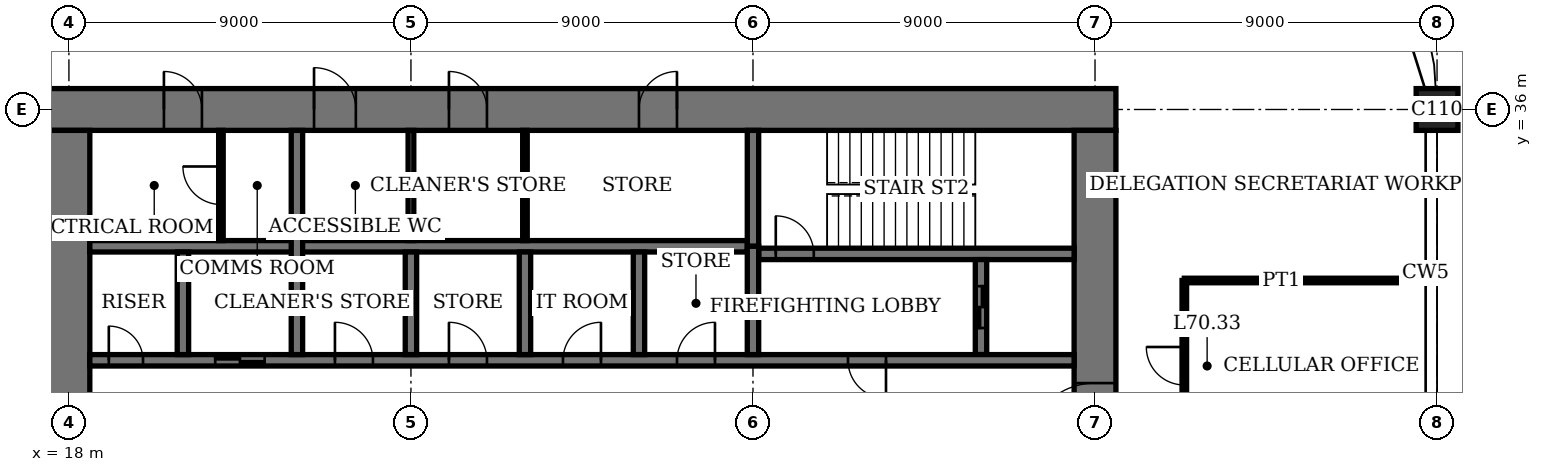
"""IFC4 building model, lengths in metres.
Left out: names, types, materials, properties, quantities, classifications, styles, units other than length and angle.
Written with IfcOpenShell. Run it as: python <this file> out.ifc"""

import sys

from ifc_helpers import new_model, si_unit, direction, frame, frame_2d, origin, origin_2d, place, context, subcontext, project, spatial, rectangle, extrude, element, fill, save


model = new_model("IFC4")
c1 = context("Model", 3, precision=1e-05, world=origin(), true_north=direction((0.0, 1.0)))
c2 = subcontext(c1, "Body", "Model", "MODEL_VIEW")
j1 = project(units=[si_unit("LENGTHUNIT", "METRE"), si_unit("PLANEANGLEUNIT", "RADIAN")], contexts=[c1])
p1 = place(None, origin())
s1 = spatial("IfcSite", under=j1, at=p1, CompositionType="ELEMENT")
p2 = place(p1, origin())
s2 = spatial("IfcBuilding", under=s1, at=p2, CompositionType="ELEMENT")
p3 = place(p2, frame((0.0, 0.0, 287.4)))
s3 = spatial("IfcBuildingStorey", under=s2, at=p3, CompositionType="ELEMENT", Elevation=287.4)
p4 = place(p3, frame((54.0, 36.0, 0.0), z_axis=(0.0, 0.0, 1.0), x_axis=(1.0, 0.0, 0.0)))
e1 = element("IfcColumn", 1, at=p4, inside=s3, PredefinedType="COLUMN", context=c2, shape_type="SweptSolid", body=[
    extrude(rectangle(XDim=1.1, YDim=1.1, at=origin_2d()), origin(), (0.0, 0.0, 1.0), 4.0),
])
p5 = place(p3, frame((45.55, 36.0, 0.0), z_axis=(0.0, 0.0, 1.0), x_axis=(-1.0, 0.0, 0.0)))
e2 = element("IfcWall", 2, at=p5, inside=s3, PredefinedType="SHEAR", context=c2, shape_type="SweptSolid", body=[
    extrude(rectangle(XDim=28.1, YDim=1.1, at=frame_2d((14.05, 0.0))), origin(), (0.0, 0.0, 1.0), 4.0),
])
p6 = place(p5, frame((11.55, 0.0, 0.0)))
e3 = element("IfcOpeningElement", 3, at=p6, cuts=e2, PredefinedType="OPENING", context=c2, shape_type="SweptSolid", body=[
    extrude(rectangle(XDim=1.0, YDim=2.4, at=frame_2d((0.5, 1.2))), frame((0.0, 0.56, 0.0), z_axis=(0.0, -1.0, 0.0), x_axis=(1.0, 0.0, 0.0)), (0.0, 0.0, 1.0), 1.12),
])
p7 = place(p5, frame((16.55, 0.0, 0.0)))
e4 = element("IfcOpeningElement", 4, at=p7, cuts=e2, PredefinedType="OPENING", context=c2, shape_type="SweptSolid", body=[
    extrude(rectangle(XDim=1.0, YDim=2.4, at=frame_2d((0.5, 1.2))), frame((0.0, 0.56, 0.0), z_axis=(0.0, -1.0, 0.0), x_axis=(1.0, 0.0, 0.0)), (0.0, 0.0, 1.0), 1.12),
])
p8 = place(p5, frame((20.0, 0.0, 0.0)))
e5 = element("IfcOpeningElement", 5, at=p8, cuts=e2, PredefinedType="OPENING", context=c2, shape_type="SweptSolid", body=[
    extrude(rectangle(XDim=1.1, YDim=2.4, at=frame_2d((0.55, 1.2))), frame((0.0, 0.56, 0.0), z_axis=(0.0, -1.0, 0.0), x_axis=(1.0, 0.0, 0.0)), (0.0, 0.0, 1.0), 1.12),
])
p9 = place(p5, frame((24.05, 0.0, 0.0)))
e6 = element("IfcOpeningElement", 6, at=p9, cuts=e2, PredefinedType="OPENING", context=c2, shape_type="SweptSolid", body=[
    extrude(rectangle(XDim=1.0, YDim=2.4, at=frame_2d((0.5, 1.2))), frame((0.0, 0.56, 0.0), z_axis=(0.0, -1.0, 0.0), x_axis=(1.0, 0.0, 0.0)), (0.0, 0.0, 1.0), 1.12),
])
p10 = place(p3, frame((18.0, 35.45, 0.0), z_axis=(0.0, 0.0, 1.0), x_axis=(0.0, -1.0, 0.0)))
e7 = element("IfcWall", 7, at=p10, inside=s3, PredefinedType="SHEAR", context=c2, shape_type="SweptSolid", body=[
    extrude(rectangle(XDim=16.9, YDim=1.1, at=frame_2d((8.45, 0.0))), origin(), (0.0, 0.0, 1.0), 4.0),
])
p11 = place(p10, frame((8.45, 0.0, 0.0)))
e8 = element("IfcOpeningElement", 8, at=p11, cuts=e7, PredefinedType="OPENING", context=c2, shape_type="SweptSolid", body=[
    extrude(rectangle(XDim=1.8, YDim=2.4, at=frame_2d((0.9, 1.2))), frame((0.0, 0.56, 0.0), z_axis=(0.0, -1.0, 0.0), x_axis=(1.0, 0.0, 0.0)), (0.0, 0.0, 1.0), 1.12),
])
p12 = place(p3, frame((45.0, 18.55, 0.0), z_axis=(0.0, 0.0, 1.0), x_axis=(0.0, 1.0, 0.0)))
e9 = element("IfcWall", 9, at=p12, inside=s3, PredefinedType="SHEAR", context=c2, shape_type="SweptSolid", body=[
    extrude(rectangle(XDim=16.9, YDim=1.1, at=frame_2d((8.45, 0.0))), origin(), (0.0, 0.0, 1.0), 4.0),
])
p13 = place(p12, frame((8.45, 0.0, 0.0)))
e10 = element("IfcOpeningElement", 10, at=p13, cuts=e9, PredefinedType="OPENING", context=c2, shape_type="SweptSolid", body=[
    extrude(rectangle(XDim=1.8, YDim=2.4, at=frame_2d((0.9, 1.2))), frame((0.0, 0.56, 0.0), z_axis=(0.0, -1.0, 0.0), x_axis=(1.0, 0.0, 0.0)), (0.0, 0.0, 1.0), 1.12),
])
p14 = place(p3, frame((36.15, 32.2, 0.0), z_axis=(0.0, 0.0, 1.0), x_axis=(1.0, 0.0, 0.0)))
e11 = element("IfcWall", 11, at=p14, inside=s3, PredefinedType="SHEAR", context=c2, shape_type="SweptSolid", body=[
    extrude(rectangle(XDim=8.3, YDim=0.3, at=frame_2d((4.15, 0.0))), origin(), (0.0, 0.0, 1.0), 4.0),
])
p15 = place(p14, frame((0.45, 0.0, 0.0)))
e12 = element("IfcOpeningElement", 12, at=p15, cuts=e11, PredefinedType="OPENING", context=c2, shape_type="SweptSolid", body=[
    extrude(rectangle(XDim=1.0, YDim=2.4, at=frame_2d((0.5, 1.2))), frame((0.0, 0.16, 0.0), z_axis=(0.0, -1.0, 0.0), x_axis=(1.0, 0.0, 0.0)), (0.0, 0.0, 1.0), 0.32),
])
p16 = place(p3, frame((36.0, 32.4, 0.0), z_axis=(0.0, 0.0, 1.0), x_axis=(0.0, 1.0, 0.0)))
e13 = element("IfcWall", 13, at=p16, inside=s3, PredefinedType="SHEAR", context=c2, shape_type="SweptSolid", body=[
    extrude(rectangle(XDim=3.05, YDim=0.3, at=frame_2d((1.525, 0.0))), origin(), (0.0, 0.0, 1.0), 4.0),
])
p17 = place(p3, frame((42.0, 29.55, 0.0), z_axis=(0.0, 0.0, 1.0), x_axis=(0.0, 1.0, 0.0)))
e14 = element("IfcWall", 14, at=p17, inside=s3, PredefinedType="SHEAR", context=c2, shape_type="SweptSolid", body=[
    extrude(rectangle(XDim=2.5, YDim=0.3, at=frame_2d((1.25, 0.0))), origin(), (0.0, 0.0, 1.0), 4.0),
])
p18 = place(p17, frame((0.7, 0.0, 0.0)))
e15 = element("IfcOpeningElement", 15, at=p18, cuts=e14, PredefinedType="OPENING", context=c2, shape_type="SweptSolid", body=[
    extrude(rectangle(XDim=1.1, YDim=2.4, at=frame_2d((0.55, 1.2))), frame((0.0, 0.16, 0.0), z_axis=(0.0, -1.0, 0.0), x_axis=(1.0, 0.0, 0.0)), (0.0, 0.0, 1.0), 0.32),
])
p19 = place(p3, frame((18.55, 29.4, 0.0), z_axis=(0.0, 0.0, 1.0), x_axis=(1.0, 0.0, 0.0)))
e16 = element("IfcWall", 16, at=p19, inside=s3, PredefinedType="SHEAR", context=c2, shape_type="SweptSolid", body=[
    extrude(rectangle(XDim=25.9, YDim=0.3, at=frame_2d((12.95, 0.0))), origin(), (0.0, 0.0, 1.0), 4.0),
])
p20 = place(p19, frame((19.95, 0.0, 0.0)))
e17 = element("IfcOpeningElement", 17, at=p20, cuts=e16, PredefinedType="OPENING", context=c2, shape_type="SweptSolid", body=[
    extrude(rectangle(XDim=1.0, YDim=2.4, at=frame_2d((0.5, 1.2))), frame((0.0, 0.16, 0.0), z_axis=(0.0, -1.0, 0.0), x_axis=(1.0, 0.0, 0.0)), (0.0, 0.0, 1.0), 0.32),
])
p21 = place(p19, frame((0.5, 0.0, 0.0)))
e18 = element("IfcOpeningElement", 18, at=p21, cuts=e16, PredefinedType="OPENING", context=c2, shape_type="SweptSolid", body=[
    extrude(rectangle(XDim=0.9, YDim=2.1, at=frame_2d((0.45, 1.05))), frame((0.0, 0.16, 0.0), z_axis=(0.0, -1.0, 0.0), x_axis=(1.0, 0.0, 0.0)), (0.0, 0.0, 1.0), 0.32),
])
p22 = place(p19, frame((15.45, 0.0, 0.0)))
e19 = element("IfcOpeningElement", 19, at=p22, cuts=e16, PredefinedType="OPENING", context=c2, shape_type="SweptSolid", body=[
    extrude(rectangle(XDim=1.0, YDim=2.4, at=frame_2d((0.5, 1.2))), frame((0.0, 0.16, 0.0), z_axis=(0.0, -1.0, 0.0), x_axis=(1.0, 0.0, 0.0)), (0.0, 0.0, 1.0), 0.32),
])
p23 = place(p19, frame((12.45, 0.0, 0.0)))
e20 = element("IfcOpeningElement", 20, at=p23, cuts=e16, PredefinedType="OPENING", context=c2, shape_type="SweptSolid", body=[
    extrude(rectangle(XDim=1.0, YDim=2.4, at=frame_2d((0.5, 1.2))), frame((0.0, 0.16, 0.0), z_axis=(0.0, -1.0, 0.0), x_axis=(1.0, 0.0, 0.0)), (0.0, 0.0, 1.0), 0.32),
])
p24 = place(p19, frame((9.45, 0.0, 0.0)))
e21 = element("IfcOpeningElement", 21, at=p24, cuts=e16, PredefinedType="OPENING", context=c2, shape_type="SweptSolid", body=[
    extrude(rectangle(XDim=1.0, YDim=2.4, at=frame_2d((0.5, 1.2))), frame((0.0, 0.16, 0.0), z_axis=(0.0, -1.0, 0.0), x_axis=(1.0, 0.0, 0.0)), (0.0, 0.0, 1.0), 0.32),
])
p25 = place(p19, frame((6.45, 0.0, 0.0)))
e22 = element("IfcOpeningElement", 22, at=p25, cuts=e16, PredefinedType="OPENING", context=c2, shape_type="SweptSolid", body=[
    extrude(rectangle(XDim=1.0, YDim=2.4, at=frame_2d((0.5, 1.2))), frame((0.0, 0.16, 0.0), z_axis=(0.0, -1.0, 0.0), x_axis=(1.0, 0.0, 0.0)), (0.0, 0.0, 1.0), 0.32),
])
p26 = place(p19, frame((3.3, 0.0, 0.0)))
e23 = element("IfcOpeningElement", 23, at=p26, cuts=e16, PredefinedType="OPENING", context=c2, shape_type="SweptSolid", body=[
    extrude(rectangle(XDim=1.3, YDim=2.4, at=frame_2d((0.65, 1.2))), frame((0.0, 0.16, 0.0), z_axis=(0.0, -1.0, 0.0), x_axis=(1.0, 0.0, 0.0)), (0.0, 0.0, 1.0), 0.32),
])
p27 = place(p3, frame((18.55, 32.4, 0.0), z_axis=(0.0, 0.0, 1.0), x_axis=(1.0, 0.0, 0.0)))
e24 = element("IfcWall", 24, at=p27, inside=s3, PredefinedType="SHEAR", context=c2, shape_type="SweptSolid", body=[
    extrude(rectangle(XDim=17.3, YDim=0.3, at=frame_2d((8.65, 0.0))), origin(), (0.0, 0.0, 1.0), 4.0),
])
for number, where, z_axis, x_axis in (
    (25, (33.0, 29.55, 0.0), (0.0, 0.0, 1.0), (0.0, 1.0, 0.0)),
    (26, (30.0, 29.55, 0.0), (0.0, 0.0, 1.0), (0.0, 1.0, 0.0)),
    (27, (27.0, 29.55, 0.0), (0.0, 0.0, 1.0), (0.0, 1.0, 0.0)),
):
    element("IfcWall", number, at=place(p3, frame(where, z_axis=z_axis, x_axis=x_axis)), inside=s3, PredefinedType="SHEAR", context=c2, shape_type="SweptSolid", body=[
        extrude(rectangle(XDim=2.7, YDim=0.3, at=frame_2d((1.35, 0.0))), origin(), (0.0, 0.0, 1.0), 4.0),
    ])
p28 = place(p3, frame((24.0, 29.55, 0.0), z_axis=(0.0, 0.0, 1.0), x_axis=(0.0, 1.0, 0.0)))
e28 = element("IfcWall", 28, at=p28, inside=s3, PredefinedType="SHEAR", context=c2, shape_type="SweptSolid", body=[
    extrude(rectangle(XDim=5.9, YDim=0.3, at=frame_2d((2.95, 0.0))), origin(), (0.0, 0.0, 1.0), 4.0),
])
p29 = place(p3, frame((21.0, 29.55, 0.0), z_axis=(0.0, 0.0, 1.0), x_axis=(0.0, 1.0, 0.0)))
e29 = element("IfcWall", 29, at=p29, inside=s3, PredefinedType="SHEAR", context=c2, shape_type="SweptSolid", body=[
    extrude(rectangle(XDim=2.7, YDim=0.3, at=frame_2d((1.35, 0.0))), origin(), (0.0, 0.0, 1.0), 4.0),
])
p30 = place(p3, frame((36.0, 29.55, 0.0), z_axis=(0.0, 0.0, 1.0), x_axis=(0.0, 1.0, 0.0)))
e30 = element("IfcWall", 30, at=p30, inside=s3, PredefinedType="SHEAR", context=c2, shape_type="SweptSolid", body=[
    extrude(rectangle(XDim=2.85, YDim=0.3, at=frame_2d((1.425, 0.0))), origin(), (0.0, 0.0, 1.0), 4.0),
])
p31 = place(p3, frame((47.35, 31.5, 0.0), z_axis=(0.0, 0.0, 1.0), x_axis=(1.0, 0.0, 0.0)))
e31 = element("IfcWall", 31, at=p31, inside=s3, PredefinedType="PARTITIONING", context=c2, shape_type="SweptSolid", body=[
    extrude(rectangle(XDim=6.34, YDim=0.12, at=frame_2d((3.17, 0.0))), origin(), (0.0, 0.0, 1.0), 3.1),
])
p32 = place(p3, frame((47.35, 27.0, 0.0), z_axis=(0.0, 0.0, 1.0), x_axis=(0.0, 1.0, 0.0)))
e32 = element("IfcWall", 32, at=p32, inside=s3, PredefinedType="PARTITIONING", context=c2, shape_type="SweptSolid", body=[
    extrude(rectangle(XDim=4.5, YDim=0.12, at=frame_2d((2.25, 0.0))), origin(), (0.0, 0.0, 1.0), 3.75),
])
p33 = place(p32, frame((1.75, 0.0, 0.0)))
e33 = element("IfcOpeningElement", 33, at=p33, cuts=e32, PredefinedType="OPENING", context=c2, shape_type="SweptSolid", body=[
    extrude(rectangle(XDim=1.0, YDim=2.4, at=frame_2d((0.5, 1.2))), frame((0.0, 0.07, 0.0), z_axis=(0.0, -1.0, 0.0), x_axis=(1.0, 0.0, 0.0)), (0.0, 0.0, 1.0), 0.14),
])
p34 = place(p3, frame((30.0, 32.55, 0.0), z_axis=(0.0, 0.0, 1.0), x_axis=(0.0, 1.0, 0.0)))
e34 = element("IfcWall", 34, at=p34, inside=s3, PredefinedType="PARTITIONING", context=c2, shape_type="SweptSolid", body=[
    extrude(rectangle(XDim=2.9, YDim=0.12, at=frame_2d((1.45, 0.0))), origin(), (0.0, 0.0, 1.0), 3.75),
])
p35 = place(p3, frame((27.0, 32.55, 0.0), z_axis=(0.0, 0.0, 1.0), x_axis=(0.0, 1.0, 0.0)))
e35 = element("IfcWall", 35, at=p35, inside=s3, PredefinedType="PARTITIONING", context=c2, shape_type="SweptSolid", body=[
    extrude(rectangle(XDim=2.9, YDim=0.15, at=frame_2d((1.45, 0.0))), origin(), (0.0, 0.0, 1.0), 3.75),
])
p36 = place(p3, frame((22.0, 32.55, 0.0), z_axis=(0.0, 0.0, 1.0), x_axis=(0.0, 1.0, 0.0)))
e36 = element("IfcWall", 36, at=p36, inside=s3, PredefinedType="PARTITIONING", context=c2, shape_type="SweptSolid", body=[
    extrude(rectangle(XDim=2.9, YDim=0.12, at=frame_2d((1.45, 0.0))), origin(), (0.0, 0.0, 1.0), 3.75),
])
p37 = place(p36, frame((0.95, 0.0, 0.0)))
e37 = element("IfcOpeningElement", 37, at=p37, cuts=e36, PredefinedType="OPENING", context=c2, shape_type="SweptSolid", body=[
    extrude(rectangle(XDim=1.0, YDim=2.4, at=frame_2d((0.5, 1.2))), frame((0.0, 0.07, 0.0), z_axis=(0.0, -1.0, 0.0), x_axis=(1.0, 0.0, 0.0)), (0.0, 0.0, 1.0), 0.14),
])
p38 = place(p13, origin())
e38 = element("IfcDoor", 38, at=p38, inside=s3, OperationType="DOUBLE_DOOR_DOUBLE_SWING", PredefinedType="DOOR", context=c2, shape_type="SweptSolid", body=[
    extrude(rectangle(XDim=1.8, YDim=2.4, at=frame_2d((0.9, 1.2))), frame((0.0, 0.03, 0.0), z_axis=(0.0, -1.0, 0.0), x_axis=(1.0, 0.0, 0.0)), (0.0, 0.0, 1.0), 0.06),
    extrude(rectangle(XDim=0.04, YDim=2.4, at=frame_2d((0.02, 1.2))), frame((0.0, 0.55, 0.0), z_axis=(0.0, -1.0, 0.0), x_axis=(1.0, 0.0, 0.0)), (0.0, 0.0, 1.0), 1.1),
    extrude(rectangle(XDim=0.04, YDim=2.4, at=frame_2d((1.78, 1.2))), frame((0.0, 0.55, 0.0), z_axis=(0.0, -1.0, 0.0), x_axis=(1.0, 0.0, 0.0)), (0.0, 0.0, 1.0), 1.1),
    extrude(rectangle(XDim=1.8, YDim=0.04, at=frame_2d((0.9, 2.38))), frame((0.0, 0.55, 0.0), z_axis=(0.0, -1.0, 0.0), x_axis=(1.0, 0.0, 0.0)), (0.0, 0.0, 1.0), 1.1),
])
fill(e10, e38)
p39 = place(p6, origin())
e39 = element("IfcDoor", 39, at=p39, inside=s3, OperationType="SINGLE_SWING_LEFT", PredefinedType="DOOR", context=c2, shape_type="SweptSolid", body=[
    extrude(rectangle(XDim=1.0, YDim=2.4, at=frame_2d((0.5, 1.2))), frame((0.0, 0.025, 0.0), z_axis=(0.0, -1.0, 0.0), x_axis=(1.0, 0.0, 0.0)), (0.0, 0.0, 1.0), 0.05),
    extrude(rectangle(XDim=0.04, YDim=2.4, at=frame_2d((0.02, 1.2))), frame((0.0, 0.4, 0.0), z_axis=(0.0, -1.0, 0.0), x_axis=(1.0, 0.0, 0.0)), (0.0, 0.0, 1.0), 0.8),
    extrude(rectangle(XDim=0.04, YDim=2.4, at=frame_2d((0.98, 1.2))), frame((0.0, 0.4, 0.0), z_axis=(0.0, -1.0, 0.0), x_axis=(1.0, 0.0, 0.0)), (0.0, 0.0, 1.0), 0.8),
    extrude(rectangle(XDim=1.0, YDim=0.04, at=frame_2d((0.5, 2.38))), frame((0.0, 0.4, 0.0), z_axis=(0.0, -1.0, 0.0), x_axis=(1.0, 0.0, 0.0)), (0.0, 0.0, 1.0), 0.8),
])
fill(e3, e39)
p40 = place(p7, origin())
e40 = element("IfcDoor", 40, at=p40, inside=s3, OperationType="SINGLE_SWING_RIGHT", PredefinedType="DOOR", context=c2, shape_type="SweptSolid", body=[
    extrude(rectangle(XDim=1.0, YDim=2.4, at=frame_2d((0.5, 1.2))), frame((0.0, 0.025, 0.0), z_axis=(0.0, -1.0, 0.0), x_axis=(1.0, 0.0, 0.0)), (0.0, 0.0, 1.0), 0.05),
    extrude(rectangle(XDim=0.04, YDim=2.4, at=frame_2d((0.02, 1.2))), frame((0.0, 0.4, 0.0), z_axis=(0.0, -1.0, 0.0), x_axis=(1.0, 0.0, 0.0)), (0.0, 0.0, 1.0), 0.8),
    extrude(rectangle(XDim=0.04, YDim=2.4, at=frame_2d((0.98, 1.2))), frame((0.0, 0.4, 0.0), z_axis=(0.0, -1.0, 0.0), x_axis=(1.0, 0.0, 0.0)), (0.0, 0.0, 1.0), 0.8),
    extrude(rectangle(XDim=1.0, YDim=0.04, at=frame_2d((0.5, 2.38))), frame((0.0, 0.4, 0.0), z_axis=(0.0, -1.0, 0.0), x_axis=(1.0, 0.0, 0.0)), (0.0, 0.0, 1.0), 0.8),
])
fill(e4, e40)
p41 = place(p8, origin())
e41 = element("IfcDoor", 41, at=p41, inside=s3, OperationType="SINGLE_SWING_RIGHT", PredefinedType="DOOR", context=c2, shape_type="SweptSolid", body=[
    extrude(rectangle(XDim=1.1, YDim=2.4, at=frame_2d((0.55, 1.2))), frame((0.0, 0.025, 0.0), z_axis=(0.0, -1.0, 0.0), x_axis=(1.0, 0.0, 0.0)), (0.0, 0.0, 1.0), 0.05),
    extrude(rectangle(XDim=0.04, YDim=2.4, at=frame_2d((0.02, 1.2))), frame((0.0, 0.44, 0.0), z_axis=(0.0, -1.0, 0.0), x_axis=(1.0, 0.0, 0.0)), (0.0, 0.0, 1.0), 0.88),
    extrude(rectangle(XDim=0.04, YDim=2.4, at=frame_2d((1.08, 1.2))), frame((0.0, 0.44, 0.0), z_axis=(0.0, -1.0, 0.0), x_axis=(1.0, 0.0, 0.0)), (0.0, 0.0, 1.0), 0.88),
    extrude(rectangle(XDim=1.1, YDim=0.04, at=frame_2d((0.55, 2.38))), frame((0.0, 0.44, 0.0), z_axis=(0.0, -1.0, 0.0), x_axis=(1.0, 0.0, 0.0)), (0.0, 0.0, 1.0), 0.88),
])
fill(e5, e41)
p42 = place(p9, origin())
e42 = element("IfcDoor", 42, at=p42, inside=s3, OperationType="SINGLE_SWING_RIGHT", PredefinedType="DOOR", context=c2, shape_type="SweptSolid", body=[
    extrude(rectangle(XDim=1.0, YDim=2.4, at=frame_2d((0.5, 1.2))), frame((0.0, 0.025, 0.0), z_axis=(0.0, -1.0, 0.0), x_axis=(1.0, 0.0, 0.0)), (0.0, 0.0, 1.0), 0.05),
    extrude(rectangle(XDim=0.04, YDim=2.4, at=frame_2d((0.02, 1.2))), frame((0.0, 0.4, 0.0), z_axis=(0.0, -1.0, 0.0), x_axis=(1.0, 0.0, 0.0)), (0.0, 0.0, 1.0), 0.8),
    extrude(rectangle(XDim=0.04, YDim=2.4, at=frame_2d((0.98, 1.2))), frame((0.0, 0.4, 0.0), z_axis=(0.0, -1.0, 0.0), x_axis=(1.0, 0.0, 0.0)), (0.0, 0.0, 1.0), 0.8),
    extrude(rectangle(XDim=1.0, YDim=0.04, at=frame_2d((0.5, 2.38))), frame((0.0, 0.4, 0.0), z_axis=(0.0, -1.0, 0.0), x_axis=(1.0, 0.0, 0.0)), (0.0, 0.0, 1.0), 0.8),
])
fill(e6, e42)
p43 = place(p15, origin())
e43 = element("IfcDoor", 43, at=p43, inside=s3, OperationType="SINGLE_SWING_RIGHT", PredefinedType="DOOR", context=c2, shape_type="SweptSolid", body=[
    extrude(rectangle(XDim=1.0, YDim=2.4, at=frame_2d((0.5, 1.2))), frame((0.0, 0.03, 0.0), z_axis=(0.0, -1.0, 0.0), x_axis=(1.0, 0.0, 0.0)), (0.0, 0.0, 1.0), 0.06),
])
fill(e12, e43)
p44 = place(p20, origin())
e44 = element("IfcDoor", 44, at=p44, inside=s3, OperationType="SINGLE_SWING_RIGHT", PredefinedType="DOOR", context=c2, shape_type="SweptSolid", body=[
    extrude(rectangle(XDim=1.0, YDim=2.4, at=frame_2d((0.5, 1.2))), frame((0.0, 0.03, 0.0), z_axis=(0.0, -1.0, 0.0), x_axis=(1.0, 0.0, 0.0)), (0.0, 0.0, 1.0), 0.06),
])
fill(e17, e44)
p45 = place(p21, origin())
e45 = element("IfcDoor", 45, at=p45, inside=s3, OperationType="SINGLE_SWING_RIGHT", PredefinedType="DOOR", context=c2, shape_type="SweptSolid", body=[
    extrude(rectangle(XDim=0.9, YDim=2.1, at=frame_2d((0.45, 1.05))), frame((0.0, 0.03, 0.0), z_axis=(0.0, -1.0, 0.0), x_axis=(1.0, 0.0, 0.0)), (0.0, 0.0, 1.0), 0.06),
])
fill(e18, e45)
p46 = place(p33, origin())
e46 = element("IfcDoor", 46, at=p46, inside=s3, OperationType="SINGLE_SWING_LEFT", PredefinedType="DOOR", context=c2, shape_type="SweptSolid", body=[
    extrude(rectangle(XDim=1.0, YDim=2.4, at=frame_2d((0.5, 1.2))), frame((0.0, 0.025, 0.0), z_axis=(0.0, -1.0, 0.0), x_axis=(1.0, 0.0, 0.0)), (0.0, 0.0, 1.0), 0.05),
])
fill(e33, e46)
p47 = place(p37, origin())
e47 = element("IfcDoor", 47, at=p47, inside=s3, OperationType="SINGLE_SWING_LEFT", PredefinedType="DOOR", context=c2, shape_type="SweptSolid", body=[
    extrude(rectangle(XDim=1.0, YDim=2.4, at=frame_2d((0.5, 1.2))), frame((0.0, 0.03, 0.0), z_axis=(0.0, -1.0, 0.0), x_axis=(1.0, 0.0, 0.0)), (0.0, 0.0, 1.0), 0.06),
])
fill(e37, e47)
p48 = place(p22, origin())
e48 = element("IfcDoor", 48, at=p48, inside=s3, OperationType="SINGLE_SWING_LEFT", PredefinedType="DOOR", context=c2, shape_type="SweptSolid", body=[
    extrude(rectangle(XDim=1.0, YDim=2.4, at=frame_2d((0.5, 1.2))), frame((0.0, 0.03, 0.0), z_axis=(0.0, -1.0, 0.0), x_axis=(1.0, 0.0, 0.0)), (0.0, 0.0, 1.0), 0.06),
])
fill(e19, e48)
p49 = place(p23, origin())
e49 = element("IfcDoor", 49, at=p49, inside=s3, OperationType="SINGLE_SWING_LEFT", PredefinedType="DOOR", context=c2, shape_type="SweptSolid", body=[
    extrude(rectangle(XDim=1.0, YDim=2.4, at=frame_2d((0.5, 1.2))), frame((0.0, 0.03, 0.0), z_axis=(0.0, -1.0, 0.0), x_axis=(1.0, 0.0, 0.0)), (0.0, 0.0, 1.0), 0.06),
])
fill(e20, e49)
p50 = place(p24, origin())
e50 = element("IfcDoor", 50, at=p50, inside=s3, OperationType="SINGLE_SWING_RIGHT", PredefinedType="DOOR", context=c2, shape_type="SweptSolid", body=[
    extrude(rectangle(XDim=1.0, YDim=2.4, at=frame_2d((0.5, 1.2))), frame((0.0, 0.03, 0.0), z_axis=(0.0, -1.0, 0.0), x_axis=(1.0, 0.0, 0.0)), (0.0, 0.0, 1.0), 0.06),
])
fill(e21, e50)
p51 = place(p25, origin())
e51 = element("IfcDoor", 51, at=p51, inside=s3, OperationType="SINGLE_SWING_RIGHT", PredefinedType="DOOR", context=c2, shape_type="SweptSolid", body=[
    extrude(rectangle(XDim=1.0, YDim=2.4, at=frame_2d((0.5, 1.2))), frame((0.0, 0.03, 0.0), z_axis=(0.0, -1.0, 0.0), x_axis=(1.0, 0.0, 0.0)), (0.0, 0.0, 1.0), 0.06),
])
fill(e22, e51)
p52 = place(p26, origin())
e52 = element("IfcDoor", 52, at=p52, inside=s3, OperationType="DOUBLE_DOOR_SLIDING", PredefinedType="DOOR", context=c2, shape_type="SweptSolid", body=[
    extrude(rectangle(XDim=1.3, YDim=2.4, at=frame_2d((0.65, 1.2))), frame((0.0, 0.02, 0.0), z_axis=(0.0, -1.0, 0.0), x_axis=(1.0, 0.0, 0.0)), (0.0, 0.0, 1.0), 0.04),
])
fill(e23, e52)
p53 = place(p18, origin())
e53 = element("IfcDoor", 53, at=p53, inside=s3, OperationType="DOUBLE_DOOR_SLIDING", PredefinedType="DOOR", context=c2, shape_type="SweptSolid", body=[
    extrude(rectangle(XDim=1.1, YDim=2.4, at=frame_2d((0.55, 1.2))), frame((0.0, 0.03, 0.0), z_axis=(0.0, -1.0, 0.0), x_axis=(1.0, 0.0, 0.0)), (0.0, 0.0, 1.0), 0.06),
])
fill(e15, e53)
save(model, sys.argv[1])
